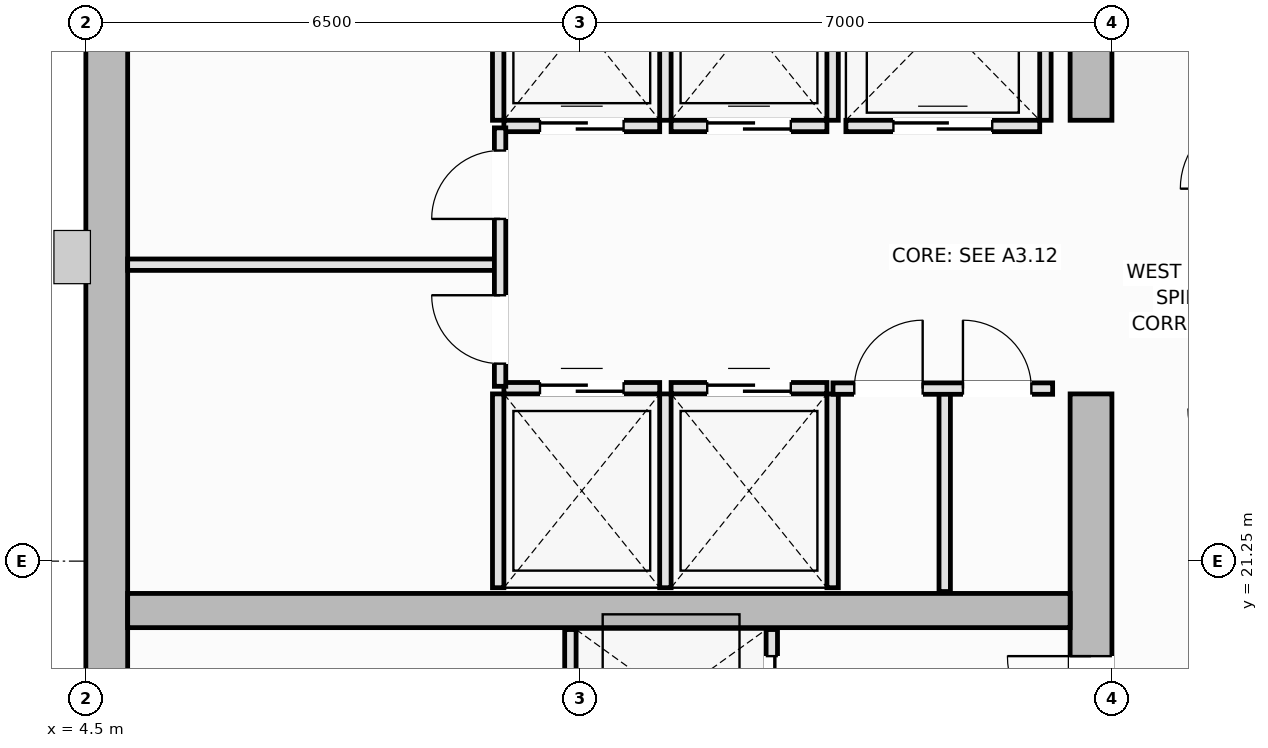
"""IFC4 building model, lengths in metres.
Left out: names, types, materials, properties, quantities, classifications, styles, units other than length and angle.
Written with IfcOpenShell. Run it as: python <this file> out.ifc"""

import sys

from ifc_helpers import new_model, si_unit, direction, frame, frame_2d, origin, place, context, subcontext, project, spatial, rectangle, extrude, element, fill, save


model = new_model("IFC4")
c1 = context("Model", 3, precision=1e-05, world=origin(), true_north=direction((0.0, 1.0)))
c2 = subcontext(c1, "Body", "Model", "MODEL_VIEW")
j1 = project(units=[si_unit("LENGTHUNIT", "METRE"), si_unit("PLANEANGLEUNIT", "RADIAN")], contexts=[c1])
p1 = place(None, origin())
s1 = spatial("IfcSite", under=j1, at=p1, CompositionType="ELEMENT")
p2 = place(p1, origin())
s2 = spatial("IfcBuilding", under=s1, at=p2, CompositionType="ELEMENT")
p3 = place(p2, frame((0.0, 0.0, 223.55)))
s3 = spatial("IfcBuildingStorey", under=s2, at=p3, CompositionType="ELEMENT", Elevation=223.55)
p4 = place(p3, frame((4.775, 14.55, 0.0), z_axis=(0.0, 0.0, 1.0), x_axis=(0.0, 1.0, 0.0)))
e1 = element("IfcWall", 1, at=p4, inside=s3, PredefinedType="SHEAR", context=c2, shape_type="SweptSolid", body=[
    extrude(rectangle(XDim=21.4, YDim=0.55, at=frame_2d((10.7, 0.0))), origin(), (0.0, 0.0, 1.0), 3.55),
])
p5 = place(p3, frame((17.725, 14.55, 0.0), z_axis=(0.0, 0.0, 1.0), x_axis=(0.0, 1.0, 0.0)))
e2 = element("IfcWall", 2, at=p5, inside=s3, PredefinedType="SHEAR", context=c2, shape_type="SweptSolid", body=[
    extrude(rectangle(XDim=8.9, YDim=0.55, at=frame_2d((4.45, 0.0))), origin(), (0.0, 0.0, 1.0), 3.55),
])
p6 = place(p5, frame((4.35, 0.0, 0.0)))
e3 = element("IfcOpeningElement", 3, at=p6, cuts=e2, PredefinedType="OPENING", context=c2, shape_type="SweptSolid", body=[
    extrude(rectangle(XDim=1.1, YDim=2.15, at=frame_2d((0.55, 1.075))), frame((0.0, 0.285, 0.0), z_axis=(0.0, -1.0, 0.0), x_axis=(1.0, 0.0, 0.0)), (0.0, 0.0, 1.0), 0.57),
])
p7 = place(p3, frame((17.725, 27.05, 0.0), z_axis=(0.0, 0.0, 1.0), x_axis=(0.0, 1.0, 0.0)))
e4 = element("IfcWall", 4, at=p7, inside=s3, PredefinedType="SHEAR", context=c2, shape_type="SweptSolid", body=[
    extrude(rectangle(XDim=8.9, YDim=0.55, at=frame_2d((4.45, 0.0))), origin(), (0.0, 0.0, 1.0), 3.55),
])
p8 = place(p7, frame((3.45, 0.0, 0.0)))
e5 = element("IfcOpeningElement", 5, at=p8, cuts=e4, PredefinedType="OPENING", context=c2, shape_type="SweptSolid", body=[
    extrude(rectangle(XDim=1.1, YDim=2.15, at=frame_2d((0.55, 1.075))), frame((0.0, 0.285, 0.0), z_axis=(0.0, -1.0, 0.0), x_axis=(1.0, 0.0, 0.0)), (0.0, 0.0, 1.0), 0.57),
])
p9 = place(p3, frame((5.05, 20.6, 0.0), z_axis=(0.0, 0.0, 1.0), x_axis=(1.0, 0.0, 0.0)))
e6 = element("IfcWall", 6, at=p9, inside=s3, PredefinedType="SHEAR", context=c2, shape_type="SweptSolid", body=[
    extrude(rectangle(XDim=12.4, YDim=0.45, at=frame_2d((6.2, 0.0))), origin(), (0.0, 0.0, 1.0), 3.55),
])
p10 = place(p3, frame((10.0, 23.525, 0.0), z_axis=(0.0, 0.0, 1.0), x_axis=(1.0, 0.0, 0.0)))
e7 = element("IfcWall", 7, at=p10, inside=s3, PredefinedType="PARTITIONING", context=c2, shape_type="SweptSolid", body=[
    extrude(rectangle(XDim=2.05, YDim=0.15, at=frame_2d((1.025, 0.0))), origin(), (0.0, 0.0, 1.0), 3.37),
])
p11 = place(p10, frame((0.475, 0.0, 0.0)))
e8 = element("IfcOpeningElement", 8, at=p11, cuts=e7, PredefinedType="OPENING", context=c2, shape_type="SweptSolid", body=[
    extrude(rectangle(XDim=1.1, YDim=2.2, at=frame_2d((0.55, 1.1))), frame((0.0, 0.085, 0.0), z_axis=(0.0, -1.0, 0.0), x_axis=(1.0, 0.0, 0.0)), (0.0, 0.0, 1.0), 0.17),
])
for number, where, z_axis, x_axis in (
    (9, (9.925, 20.9, 0.0), (0.0, 0.0, 1.0), (0.0, 1.0, 0.0)),
    (10, (12.125, 20.9, 0.0), (0.0, 0.0, 1.0), (0.0, 1.0, 0.0)),
):
    element("IfcWall", number, at=place(p3, frame(where, z_axis=z_axis, x_axis=x_axis)), inside=s3, PredefinedType="PARTITIONING", context=c2, shape_type="SweptSolid", body=[
        extrude(rectangle(XDim=2.55, YDim=0.15, at=frame_2d((1.275, 0.0))), origin(), (0.0, 0.0, 1.0), 3.37),
    ])
p12 = place(p3, frame((12.2, 23.525, 0.0), z_axis=(0.0, 0.0, 1.0), x_axis=(1.0, 0.0, 0.0)))
e11 = element("IfcWall", 11, at=p12, inside=s3, PredefinedType="PARTITIONING", context=c2, shape_type="SweptSolid", body=[
    extrude(rectangle(XDim=2.05, YDim=0.15, at=frame_2d((1.025, 0.0))), origin(), (0.0, 0.0, 1.0), 3.37),
])
p13 = place(p12, frame((0.475, 0.0, 0.0)))
e12 = element("IfcOpeningElement", 12, at=p13, cuts=e11, PredefinedType="OPENING", context=c2, shape_type="SweptSolid", body=[
    extrude(rectangle(XDim=1.1, YDim=2.2, at=frame_2d((0.55, 1.1))), frame((0.0, 0.085, 0.0), z_axis=(0.0, -1.0, 0.0), x_axis=(1.0, 0.0, 0.0)), (0.0, 0.0, 1.0), 0.17),
])
p14 = place(p3, frame((14.325, 20.9, 0.0), z_axis=(0.0, 0.0, 1.0), x_axis=(0.0, 1.0, 0.0)))
e13 = element("IfcWall", 13, at=p14, inside=s3, PredefinedType="PARTITIONING", context=c2, shape_type="SweptSolid", body=[
    extrude(rectangle(XDim=2.55, YDim=0.15, at=frame_2d((1.275, 0.0))), origin(), (0.0, 0.0, 1.0), 3.37),
])
p15 = place(p3, frame((10.0, 26.975, 0.0), z_axis=(0.0, 0.0, 1.0), x_axis=(1.0, 0.0, 0.0)))
e14 = element("IfcWall", 14, at=p15, inside=s3, PredefinedType="PARTITIONING", context=c2, shape_type="SweptSolid", body=[
    extrude(rectangle(XDim=2.05, YDim=0.15, at=frame_2d((1.025, 0.0))), origin(), (0.0, 0.0, 1.0), 3.37),
])
p16 = place(p15, frame((0.475, 0.0, 0.0)))
e15 = element("IfcOpeningElement", 15, at=p16, cuts=e14, PredefinedType="OPENING", context=c2, shape_type="SweptSolid", body=[
    extrude(rectangle(XDim=1.1, YDim=2.2, at=frame_2d((0.55, 1.1))), frame((0.0, 0.085, 0.0), z_axis=(0.0, -1.0, 0.0), x_axis=(1.0, 0.0, 0.0)), (0.0, 0.0, 1.0), 0.17),
])
for number, where, z_axis, x_axis in (
    (16, (9.925, 27.05, 0.0), (0.0, 0.0, 1.0), (0.0, 1.0, 0.0)),
    (17, (12.125, 27.05, 0.0), (0.0, 0.0, 1.0), (0.0, 1.0, 0.0)),
):
    element("IfcWall", number, at=place(p3, frame(where, z_axis=z_axis, x_axis=x_axis)), inside=s3, PredefinedType="PARTITIONING", context=c2, shape_type="SweptSolid", body=[
        extrude(rectangle(XDim=2.55, YDim=0.15, at=frame_2d((1.275, 0.0))), origin(), (0.0, 0.0, 1.0), 3.37),
    ])
p17 = place(p3, frame((12.2, 26.975, 0.0), z_axis=(0.0, 0.0, 1.0), x_axis=(1.0, 0.0, 0.0)))
e18 = element("IfcWall", 18, at=p17, inside=s3, PredefinedType="PARTITIONING", context=c2, shape_type="SweptSolid", body=[
    extrude(rectangle(XDim=2.05, YDim=0.15, at=frame_2d((1.025, 0.0))), origin(), (0.0, 0.0, 1.0), 3.37),
])
p18 = place(p17, frame((0.475, 0.0, 0.0)))
e19 = element("IfcOpeningElement", 19, at=p18, cuts=e18, PredefinedType="OPENING", context=c2, shape_type="SweptSolid", body=[
    extrude(rectangle(XDim=1.1, YDim=2.2, at=frame_2d((0.55, 1.1))), frame((0.0, 0.085, 0.0), z_axis=(0.0, -1.0, 0.0), x_axis=(1.0, 0.0, 0.0)), (0.0, 0.0, 1.0), 0.17),
])
p19 = place(p3, frame((14.325, 27.05, 0.0), z_axis=(0.0, 0.0, 1.0), x_axis=(0.0, 1.0, 0.0)))
e20 = element("IfcWall", 20, at=p19, inside=s3, PredefinedType="PARTITIONING", context=c2, shape_type="SweptSolid", body=[
    extrude(rectangle(XDim=2.55, YDim=0.15, at=frame_2d((1.275, 0.0))), origin(), (0.0, 0.0, 1.0), 3.37),
])
p20 = place(p3, frame((14.5, 26.975, 0.0), z_axis=(0.0, 0.0, 1.0), x_axis=(1.0, 0.0, 0.0)))
e21 = element("IfcWall", 21, at=p20, inside=s3, PredefinedType="PARTITIONING", context=c2, shape_type="SweptSolid", body=[
    extrude(rectangle(XDim=2.55, YDim=0.15, at=frame_2d((1.275, 0.0))), origin(), (0.0, 0.0, 1.0), 3.37),
])
p21 = place(p20, frame((0.625, 0.0, 0.0)))
e22 = element("IfcOpeningElement", 22, at=p21, cuts=e21, PredefinedType="OPENING", context=c2, shape_type="SweptSolid", body=[
    extrude(rectangle(XDim=1.3, YDim=2.2, at=frame_2d((0.65, 1.1))), frame((0.0, 0.085, 0.0), z_axis=(0.0, -1.0, 0.0), x_axis=(1.0, 0.0, 0.0)), (0.0, 0.0, 1.0), 0.17),
])
p22 = place(p3, frame((17.125, 27.05, 0.0), z_axis=(0.0, 0.0, 1.0), x_axis=(0.0, 1.0, 0.0)))
e23 = element("IfcWall", 23, at=p22, inside=s3, PredefinedType="PARTITIONING", context=c2, shape_type="SweptSolid", body=[
    extrude(rectangle(XDim=2.6, YDim=0.15, at=frame_2d((1.3, 0.0))), origin(), (0.0, 0.0, 1.0), 3.37),
])
p23 = place(p3, frame((10.875, 18.55, 0.0), z_axis=(0.0, 0.0, 1.0), x_axis=(0.0, 1.0, 0.0)))
e24 = element("IfcWall", 24, at=p23, inside=s3, PredefinedType="PARTITIONING", context=c2, shape_type="SweptSolid", body=[
    extrude(rectangle(XDim=1.8, YDim=0.15, at=frame_2d((0.9, 0.0))), origin(), (0.0, 0.0, 1.0), 3.37),
])
p24 = place(p3, frame((13.525, 18.55, 0.0), z_axis=(0.0, 0.0, 1.0), x_axis=(0.0, 1.0, 0.0)))
e25 = element("IfcWall", 25, at=p24, inside=s3, PredefinedType="PARTITIONING", context=c2, shape_type="SweptSolid", body=[
    extrude(rectangle(XDim=1.8, YDim=0.15, at=frame_2d((0.9, 0.0))), origin(), (0.0, 0.0, 1.0), 3.37),
])
p25 = place(p24, frame((0.35, 0.0, 0.0)))
e26 = element("IfcOpeningElement", 26, at=p25, cuts=e25, PredefinedType="OPENING", context=c2, shape_type="SweptSolid", body=[
    extrude(rectangle(XDim=1.1, YDim=2.2, at=frame_2d((0.55, 1.1))), frame((0.0, 0.085, 0.0), z_axis=(0.0, -1.0, 0.0), x_axis=(1.0, 0.0, 0.0)), (0.0, 0.0, 1.0), 0.17),
])
p26 = place(p3, frame((5.05, 25.15, 0.0), z_axis=(0.0, 0.0, 1.0), x_axis=(1.0, 0.0, 0.0)))
e27 = element("IfcWall", 27, at=p26, inside=s3, PredefinedType="PARTITIONING", context=c2, shape_type="SweptSolid", body=[
    extrude(rectangle(XDim=4.9, YDim=0.15, at=frame_2d((2.45, 0.0))), origin(), (0.0, 0.0, 1.0), 3.37),
])
p27 = place(p3, frame((9.95, 23.55, 0.0), z_axis=(0.0, 0.0, 1.0), x_axis=(0.0, 1.0, 0.0)))
e28 = element("IfcWall", 28, at=p27, inside=s3, PredefinedType="PARTITIONING", context=c2, shape_type="SweptSolid", body=[
    extrude(rectangle(XDim=3.4, YDim=0.15, at=frame_2d((1.7, 0.0))), origin(), (0.0, 0.0, 1.0), 3.37),
])
p28 = place(p27, frame((0.298, 0.0, 0.0)))
e29 = element("IfcOpeningElement", 29, at=p28, cuts=e28, PredefinedType="OPENING", context=c2, shape_type="SweptSolid", body=[
    extrude(rectangle(XDim=0.9, YDim=2.1, at=frame_2d((0.45, 1.05))), frame((0.0, 0.085, 0.0), z_axis=(0.0, -1.0, 0.0), x_axis=(1.0, 0.0, 0.0)), (0.0, 0.0, 1.0), 0.17),
])
p29 = place(p27, frame((2.202, 0.0, 0.0)))
e30 = element("IfcOpeningElement", 30, at=p29, cuts=e28, PredefinedType="OPENING", context=c2, shape_type="SweptSolid", body=[
    extrude(rectangle(XDim=0.9, YDim=2.1, at=frame_2d((0.45, 1.05))), frame((0.0, 0.085, 0.0), z_axis=(0.0, -1.0, 0.0), x_axis=(1.0, 0.0, 0.0)), (0.0, 0.0, 1.0), 0.17),
])
p30 = place(p3, frame((15.8, 20.85, 0.0), z_axis=(0.0, 0.0, 1.0), x_axis=(0.0, 1.0, 0.0)))
e31 = element("IfcWall", 31, at=p30, inside=s3, PredefinedType="PARTITIONING", context=c2, shape_type="SweptSolid", body=[
    extrude(rectangle(XDim=2.67, YDim=0.15, at=frame_2d((1.335, 0.0))), origin(), (0.0, 0.0, 1.0), 3.37),
])
p31 = place(p3, frame((14.33, 23.52, 0.0), z_axis=(0.0, 0.0, 1.0), x_axis=(1.0, 0.0, 0.0)))
e32 = element("IfcWall", 32, at=p31, inside=s3, PredefinedType="PARTITIONING", context=c2, shape_type="SweptSolid", body=[
    extrude(rectangle(XDim=2.89, YDim=0.15, at=frame_2d((1.445, 0.0))), origin(), (0.0, 0.0, 1.0), 3.37),
])
p32 = place(p31, frame((0.28, 0.0, 0.0)))
e33 = element("IfcOpeningElement", 33, at=p32, cuts=e32, PredefinedType="OPENING", context=c2, shape_type="SweptSolid", body=[
    extrude(rectangle(XDim=0.9, YDim=2.1, at=frame_2d((0.45, 1.05))), frame((0.0, 0.085, 0.0), z_axis=(0.0, -1.0, 0.0), x_axis=(1.0, 0.0, 0.0)), (0.0, 0.0, 1.0), 0.17),
])
p33 = place(p31, frame((1.71, 0.0, 0.0)))
e34 = element("IfcOpeningElement", 34, at=p33, cuts=e32, PredefinedType="OPENING", context=c2, shape_type="SweptSolid", body=[
    extrude(rectangle(XDim=0.9, YDim=2.1, at=frame_2d((0.45, 1.05))), frame((0.0, 0.085, 0.0), z_axis=(0.0, -1.0, 0.0), x_axis=(1.0, 0.0, 0.0)), (0.0, 0.0, 1.0), 0.17),
])
p34 = place(p11, origin())
e35 = element("IfcDoor", 35, at=p34, inside=s3, OperationType="DOUBLE_DOOR_SLIDING", PredefinedType="DOOR", context=c2, shape_type="SweptSolid", body=[
    extrude(rectangle(XDim=1.1, YDim=2.2, at=frame_2d((0.55, 1.1))), frame((0.0, 0.025, 0.0), z_axis=(0.0, -1.0, 0.0), x_axis=(1.0, 0.0, 0.0)), (0.0, 0.0, 1.0), 0.05),
])
fill(e8, e35)
p35 = place(p13, origin())
e36 = element("IfcDoor", 36, at=p35, inside=s3, OperationType="DOUBLE_DOOR_SLIDING", PredefinedType="DOOR", context=c2, shape_type="SweptSolid", body=[
    extrude(rectangle(XDim=1.1, YDim=2.2, at=frame_2d((0.55, 1.1))), frame((0.0, 0.025, 0.0), z_axis=(0.0, -1.0, 0.0), x_axis=(1.0, 0.0, 0.0)), (0.0, 0.0, 1.0), 0.05),
])
fill(e12, e36)
p36 = place(p16, origin())
e37 = element("IfcDoor", 37, at=p36, inside=s3, OperationType="DOUBLE_DOOR_SLIDING", PredefinedType="DOOR", context=c2, shape_type="SweptSolid", body=[
    extrude(rectangle(XDim=1.1, YDim=2.2, at=frame_2d((0.55, 1.1))), frame((0.0, 0.025, 0.0), z_axis=(0.0, -1.0, 0.0), x_axis=(1.0, 0.0, 0.0)), (0.0, 0.0, 1.0), 0.05),
])
fill(e15, e37)
p37 = place(p18, origin())
e38 = element("IfcDoor", 38, at=p37, inside=s3, OperationType="DOUBLE_DOOR_SLIDING", PredefinedType="DOOR", context=c2, shape_type="SweptSolid", body=[
    extrude(rectangle(XDim=1.1, YDim=2.2, at=frame_2d((0.55, 1.1))), frame((0.0, 0.025, 0.0), z_axis=(0.0, -1.0, 0.0), x_axis=(1.0, 0.0, 0.0)), (0.0, 0.0, 1.0), 0.05),
])
fill(e19, e38)
p38 = place(p21, origin())
e39 = element("IfcDoor", 39, at=p38, inside=s3, OperationType="DOUBLE_DOOR_SLIDING", PredefinedType="DOOR", context=c2, shape_type="SweptSolid", body=[
    extrude(rectangle(XDim=1.3, YDim=2.2, at=frame_2d((0.65, 1.1))), frame((0.0, 0.025, 0.0), z_axis=(0.0, -1.0, 0.0), x_axis=(1.0, 0.0, 0.0)), (0.0, 0.0, 1.0), 0.05),
])
fill(e22, e39)
p39 = place(p25, origin())
e40 = element("IfcDoor", 40, at=p39, inside=s3, OperationType="DOUBLE_DOOR_SLIDING", PredefinedType="DOOR", context=c2, shape_type="SweptSolid", body=[
    extrude(rectangle(XDim=1.1, YDim=2.2, at=frame_2d((0.55, 1.1))), frame((0.0, 0.025, 0.0), z_axis=(0.0, -1.0, 0.0), x_axis=(1.0, 0.0, 0.0)), (0.0, 0.0, 1.0), 0.05),
])
fill(e26, e40)
p40 = place(p6, origin())
e41 = element("IfcDoor", 41, at=p40, inside=s3, OperationType="SINGLE_SWING_RIGHT", PredefinedType="DOOR", context=c2, shape_type="SweptSolid", body=[
    extrude(rectangle(XDim=1.1, YDim=2.15, at=frame_2d((0.55, 1.075))), frame((0.0, 0.025, 0.0), z_axis=(0.0, -1.0, 0.0), x_axis=(1.0, 0.0, 0.0)), (0.0, 0.0, 1.0), 0.05),
])
fill(e3, e41)
p41 = place(p28, origin())
e42 = element("IfcDoor", 42, at=p41, inside=s3, OperationType="SINGLE_SWING_RIGHT", PredefinedType="DOOR", context=c2, shape_type="SweptSolid", body=[
    extrude(rectangle(XDim=0.9, YDim=2.1, at=frame_2d((0.45, 1.05))), frame((0.0, 0.025, 0.0), z_axis=(0.0, -1.0, 0.0), x_axis=(1.0, 0.0, 0.0)), (0.0, 0.0, 1.0), 0.05),
])
fill(e29, e42)
p42 = place(p29, origin())
e43 = element("IfcDoor", 43, at=p42, inside=s3, OperationType="SINGLE_SWING_LEFT", PredefinedType="DOOR", context=c2, shape_type="SweptSolid", body=[
    extrude(rectangle(XDim=0.9, YDim=2.1, at=frame_2d((0.45, 1.05))), frame((0.0, 0.025, 0.0), z_axis=(0.0, -1.0, 0.0), x_axis=(1.0, 0.0, 0.0)), (0.0, 0.0, 1.0), 0.05),
])
fill(e30, e43)
p43 = place(p32, origin())
e44 = element("IfcDoor", 44, at=p43, inside=s3, OperationType="SINGLE_SWING_RIGHT", PredefinedType="DOOR", context=c2, shape_type="SweptSolid", body=[
    extrude(rectangle(XDim=0.9, YDim=2.1, at=frame_2d((0.45, 1.05))), frame((0.0, 0.025, 0.0), z_axis=(0.0, -1.0, 0.0), x_axis=(1.0, 0.0, 0.0)), (0.0, 0.0, 1.0), 0.05),
])
fill(e33, e44)
p44 = place(p33, origin())
e45 = element("IfcDoor", 45, at=p44, inside=s3, OperationType="SINGLE_SWING_LEFT", PredefinedType="DOOR", context=c2, shape_type="SweptSolid", body=[
    extrude(rectangle(XDim=0.9, YDim=2.1, at=frame_2d((0.45, 1.05))), frame((0.0, 0.025, 0.0), z_axis=(0.0, -1.0, 0.0), x_axis=(1.0, 0.0, 0.0)), (0.0, 0.0, 1.0), 0.05),
])
fill(e34, e45)
save(model, sys.argv[1])
